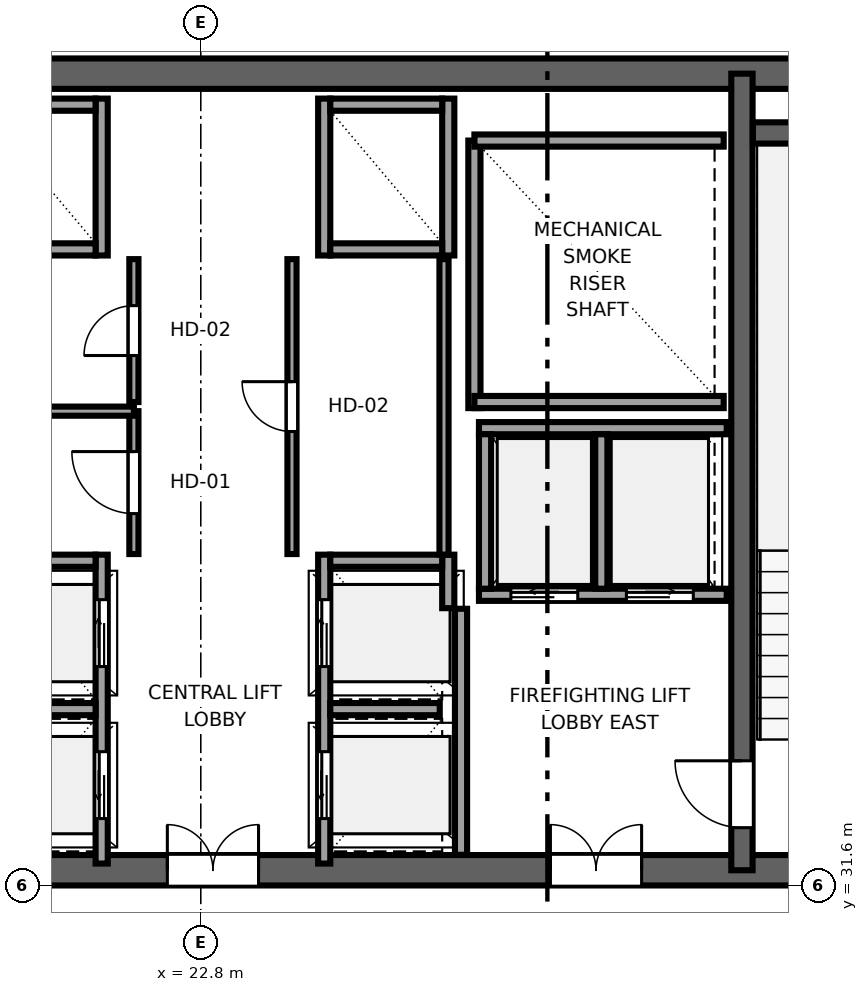
"""IFC4 building model, lengths in metres.
Left out: names, types, materials, properties, quantities, classifications, styles, units other than length and angle.
Written with IfcOpenShell. Run it as: python <this file> out.ifc"""

import sys

from ifc_helpers import new_model, si_unit, direction, frame, frame_2d, origin, place, context, subcontext, project, spatial, rectangle, extrude, source, transform, mapped, element, fill, save


model = new_model("IFC4")
c1 = context("Model", 3, precision=1e-05, world=origin(), true_north=direction((0.0, 1.0)))
c2 = subcontext(c1, "Body", "Model", "MODEL_VIEW")
j1 = project(units=[si_unit("LENGTHUNIT", "METRE"), si_unit("PLANEANGLEUNIT", "RADIAN")], contexts=[c1])
p1 = place(None, origin())
s1 = spatial("IfcSite", under=j1, at=p1, CompositionType="ELEMENT")
p2 = place(p1, origin())
s2 = spatial("IfcBuilding", under=s1, at=p2, CompositionType="ELEMENT")
p3 = place(p2, frame((0.0, 0.0, 255.85)))
s3 = spatial("IfcBuildingStorey", under=s2, at=p3, CompositionType="ELEMENT", Elevation=255.85)
p4 = place(p3, frame((10.0, 31.85, 0.0), z_axis=(0.0, 0.0, 1.0), x_axis=(1.0, 0.0, 0.0)))
e1 = element("IfcWall", 1, at=p4, inside=s3, PredefinedType="SHEAR", context=c2, shape_type="SweptSolid", body=[
    extrude(rectangle(XDim=26.0, YDim=0.5, at=frame_2d((13.0, 0.0))), origin(), (0.0, 0.0, 1.0), 3.55),
])
p5 = place(p4, frame((7.45, 0.0, 0.0), z_axis=(0.0, 0.0, 1.0), x_axis=(-1.0, 0.0, 0.0)))
e2 = element("IfcOpeningElement", 2, at=p5, cuts=e1, PredefinedType="OPENING", context=c2, shape_type="SweptSolid", body=[
    extrude(rectangle(XDim=1.5, YDim=2.04, at=frame_2d((0.75, 1.02))), frame((0.0, 0.26, 0.0), z_axis=(0.0, -1.0, 0.0), x_axis=(1.0, 0.0, 0.0)), (0.0, 0.0, 1.0), 0.52),
])
p6 = place(p4, frame((13.75, 0.0, 0.0), z_axis=(0.0, 0.0, 1.0), x_axis=(-1.0, 0.0, 0.0)))
e3 = element("IfcOpeningElement", 3, at=p6, cuts=e1, PredefinedType="OPENING", context=c2, shape_type="SweptSolid", body=[
    extrude(rectangle(XDim=1.5, YDim=2.04, at=frame_2d((0.75, 1.02))), frame((0.0, 0.26, 0.0), z_axis=(0.0, -1.0, 0.0), x_axis=(1.0, 0.0, 0.0)), (0.0, 0.0, 1.0), 0.52),
])
p7 = place(p4, frame((20.05, 0.0, 0.0), z_axis=(0.0, 0.0, 1.0), x_axis=(-1.0, 0.0, 0.0)))
e4 = element("IfcOpeningElement", 4, at=p7, cuts=e1, PredefinedType="OPENING", context=c2, shape_type="SweptSolid", body=[
    extrude(rectangle(XDim=1.5, YDim=2.04, at=frame_2d((0.75, 1.02))), frame((0.0, 0.26, 0.0), z_axis=(0.0, -1.0, 0.0), x_axis=(1.0, 0.0, 0.0)), (0.0, 0.0, 1.0), 0.52),
])
p8 = place(p3, frame((10.0, 44.95, 0.0), z_axis=(0.0, 0.0, 1.0), x_axis=(1.0, 0.0, 0.0)))
e5 = element("IfcWall", 5, at=p8, inside=s3, PredefinedType="SHEAR", context=c2, shape_type="SweptSolid", body=[
    extrude(rectangle(XDim=26.0, YDim=0.5, at=frame_2d((13.0, 0.0))), origin(), (0.0, 0.0, 1.0), 3.55),
])
p9 = place(p3, frame((31.7, 31.85, 0.0), z_axis=(0.0, 0.0, 1.0), x_axis=(0.0, 1.0, 0.0)))
e6 = element("IfcWall", 6, at=p9, inside=s3, PredefinedType="SHEAR", context=c2, shape_type="SweptSolid", body=[
    extrude(rectangle(XDim=13.1, YDim=0.35, at=frame_2d((6.55, 0.0))), origin(), (0.0, 0.0, 1.0), 3.55),
])
p10 = place(p9, frame((1.8, 0.0, 0.0), z_axis=(0.0, 0.0, 1.0), x_axis=(-1.0, 0.0, 0.0)))
e7 = element("IfcOpeningElement", 7, at=p10, cuts=e6, PredefinedType="OPENING", context=c2, shape_type="SweptSolid", body=[
    extrude(rectangle(XDim=1.1, YDim=2.12, at=frame_2d((0.55, 1.06))), frame((0.0, 0.185, 0.0), z_axis=(0.0, -1.0, 0.0), x_axis=(1.0, 0.0, 0.0)), (0.0, 0.0, 1.0), 0.37),
])
p11 = place(p3, frame((31.88, 43.975, 0.0), z_axis=(0.0, 0.0, 1.0), x_axis=(1.0, 0.0, 0.0)))
e8 = element("IfcWall", 8, at=p11, inside=s3, PredefinedType="SHEAR", context=c2, shape_type="SweptSolid", body=[
    extrude(rectangle(XDim=3.6, YDim=0.35, at=frame_2d((1.8, 0.0))), origin(), (0.0, 0.0, 1.0), 3.55),
])
p12 = place(p3, frame((27.3, 39.45, 0.0), z_axis=(0.0, 0.0, 1.0), x_axis=(0.0, 1.0, 0.0)))
e9 = element("IfcWall", 9, at=p12, inside=s3, PredefinedType="SOLIDWALL", context=c2, shape_type="SweptSolid", body=[
    extrude(rectangle(XDim=4.4, YDim=0.2, at=frame_2d((2.2, 0.0))), origin(), (0.0, 0.0, 1.0), 3.37),
])
for number, where, z_axis, x_axis in (
    (10, (27.3, 39.55, 0.0), (0.0, 0.0, 1.0), (1.0, 0.0, 0.0)),
    (11, (27.3, 43.85, 0.0), (0.0, 0.0, 1.0), (1.0, 0.0, 0.0)),
):
    element("IfcWall", number, at=place(p3, frame(where, z_axis=z_axis, x_axis=x_axis)), inside=s3, PredefinedType="SOLIDWALL", context=c2, shape_type="SweptSolid", body=[
        extrude(rectangle(XDim=4.1, YDim=0.2, at=frame_2d((2.05, 0.0))), origin(), (0.0, 0.0, 1.0), 3.37),
    ])
p13 = place(p3, frame((27.08, 32.104, 0.0), z_axis=(0.0, 0.0, 1.0), x_axis=(0.0, 1.0, 0.0)))
e12 = element("IfcWall", 12, at=p13, inside=s3, PredefinedType="SOLIDWALL", context=c2, shape_type="SweptSolid", body=[
    extrude(rectangle(XDim=4.046, YDim=0.2, at=frame_2d((2.023, 0.0))), origin(), (0.0, 0.0, 1.0), 3.37),
])
p14 = place(p3, frame((21.17, 31.96, 0.0), z_axis=(0.0, 0.0, 1.0), x_axis=(0.0, 1.0, 0.0)))
e13 = element("IfcWall", 13, at=p14, inside=s3, PredefinedType="SOLIDWALL", context=c2, shape_type="SweptSolid", body=[
    extrude(rectangle(XDim=5.08, YDim=0.2, at=frame_2d((2.54, 0.0))), origin(), (0.0, 0.0, 1.0), 3.37),
])
p15 = place(p14, frame((0.74, 0.0, 0.0)))
e14 = element("IfcOpeningElement", 14, at=p15, cuts=e13, PredefinedType="OPENING", context=c2, shape_type="SweptSolid", body=[
    extrude(rectangle(XDim=1.1, YDim=2.12, at=frame_2d((0.55, 1.06))), frame((0.0, 0.11, 0.0), z_axis=(0.0, -1.0, 0.0), x_axis=(1.0, 0.0, 0.0)), (0.0, 0.0, 1.0), 0.22),
])
p16 = place(p14, frame((3.24, 0.0, 0.0)))
e15 = element("IfcOpeningElement", 15, at=p16, cuts=e13, PredefinedType="OPENING", context=c2, shape_type="SweptSolid", body=[
    extrude(rectangle(XDim=1.1, YDim=2.12, at=frame_2d((0.55, 1.06))), frame((0.0, 0.11, 0.0), z_axis=(0.0, -1.0, 0.0), x_axis=(1.0, 0.0, 0.0)), (0.0, 0.0, 1.0), 0.22),
])
p17 = place(p3, frame((19.23, 36.94, 0.0), z_axis=(0.0, 0.0, 1.0), x_axis=(1.0, 0.0, 0.0)))
e16 = element("IfcWall", 16, at=p17, inside=s3, PredefinedType="SOLIDWALL", context=c2, shape_type="SweptSolid", body=[
    extrude(rectangle(XDim=1.84, YDim=0.2, at=frame_2d((0.92, 0.0))), origin(), (0.0, 0.0, 1.0), 3.37),
])
p18 = place(p3, frame((19.27, 34.5, 0.0), z_axis=(0.0, 0.0, 1.0), x_axis=(1.0, 0.0, 0.0)))
e17 = element("IfcWall", 17, at=p18, inside=s3, PredefinedType="SOLIDWALL", context=c2, shape_type="SweptSolid", body=[
    extrude(rectangle(XDim=1.8, YDim=0.2, at=frame_2d((0.9, 0.0))), origin(), (0.0, 0.0, 1.0), 3.37),
])
p19 = place(p3, frame((21.17, 41.96, 0.0), z_axis=(0.0, 0.0, 1.0), x_axis=(0.0, 1.0, 0.0)))
e18 = element("IfcWall", 18, at=p19, inside=s3, PredefinedType="SOLIDWALL", context=c2, shape_type="SweptSolid", body=[
    extrude(rectangle(XDim=2.58, YDim=0.2, at=frame_2d((1.29, 0.0))), origin(), (0.0, 0.0, 1.0), 3.37),
])
for number, where, z_axis, x_axis in (
    (19, (19.23, 42.06, 0.0), (0.0, 0.0, 1.0), (1.0, 0.0, 0.0)),
    (20, (19.23, 44.44, 0.0), (0.0, 0.0, 1.0), (1.0, 0.0, 0.0)),
):
    element("IfcWall", number, at=place(p3, frame(where, z_axis=z_axis, x_axis=x_axis)), inside=s3, PredefinedType="SOLIDWALL", context=c2, shape_type="SweptSolid", body=[
        extrude(rectangle(XDim=1.84, YDim=0.2, at=frame_2d((0.92, 0.0))), origin(), (0.0, 0.0, 1.0), 3.37),
    ])
p20 = place(p3, frame((27.375, 36.38, 0.0), z_axis=(0.0, 0.0, 1.0), x_axis=(1.0, 0.0, 0.0)))
e21 = element("IfcWall", 21, at=p20, inside=s3, PredefinedType="SOLIDWALL", context=c2, shape_type="SweptSolid", body=[
    extrude(rectangle(XDim=4.075, YDim=0.2, at=frame_2d((2.038, 0.0))), origin(), (0.0, 0.0, 1.0), 3.37),
])
p21 = place(p20, frame((0.525, 0.0, 0.0)))
e22 = element("IfcOpeningElement", 22, at=p21, cuts=e21, PredefinedType="OPENING", context=c2, shape_type="SweptSolid", body=[
    extrude(rectangle(XDim=1.1, YDim=2.12, at=frame_2d((0.55, 1.06))), frame((0.0, 0.11, 0.0), z_axis=(0.0, -1.0, 0.0), x_axis=(1.0, 0.0, 0.0)), (0.0, 0.0, 1.0), 0.22),
])
p22 = place(p20, frame((2.425, 0.0, 0.0)))
e23 = element("IfcOpeningElement", 23, at=p22, cuts=e21, PredefinedType="OPENING", context=c2, shape_type="SweptSolid", body=[
    extrude(rectangle(XDim=1.1, YDim=2.12, at=frame_2d((0.55, 1.06))), frame((0.0, 0.11, 0.0), z_axis=(0.0, -1.0, 0.0), x_axis=(1.0, 0.0, 0.0)), (0.0, 0.0, 1.0), 0.22),
])
p23 = place(p3, frame((27.375, 39.12, 0.0), z_axis=(0.0, 0.0, 1.0), x_axis=(1.0, 0.0, 0.0)))
e24 = element("IfcWall", 24, at=p23, inside=s3, PredefinedType="SOLIDWALL", context=c2, shape_type="SweptSolid", body=[
    extrude(rectangle(XDim=4.075, YDim=0.2, at=frame_2d((2.038, 0.0))), origin(), (0.0, 0.0, 1.0), 3.37),
])
for number, where, z_axis, x_axis in (
    (25, (27.475, 36.48, 0.0), (0.0, 0.0, 1.0), (0.0, 1.0, 0.0)),
    (26, (29.387, 36.48, 0.0), (0.0, 0.0, 1.0), (0.0, 1.0, 0.0)),
):
    element("IfcWall", number, at=place(p3, frame(where, z_axis=z_axis, x_axis=x_axis)), inside=s3, PredefinedType="SOLIDWALL", context=c2, shape_type="SweptSolid", body=[
        extrude(rectangle(XDim=2.54, YDim=0.2, at=frame_2d((1.27, 0.0))), origin(), (0.0, 0.0, 1.0), 3.37),
    ])
p24 = place(p3, frame((24.83, 31.96, 0.0), z_axis=(0.0, 0.0, 1.0), x_axis=(0.0, 1.0, 0.0)))
e27 = element("IfcWall", 27, at=p24, inside=s3, PredefinedType="SOLIDWALL", context=c2, shape_type="SweptSolid", body=[
    extrude(rectangle(XDim=5.08, YDim=0.2, at=frame_2d((2.54, 0.0))), origin(), (0.0, 0.0, 1.0), 3.37),
])
p25 = place(p24, frame((0.74, 0.0, 0.0)))
e28 = element("IfcOpeningElement", 28, at=p25, cuts=e27, PredefinedType="OPENING", context=c2, shape_type="SweptSolid", body=[
    extrude(rectangle(XDim=1.1, YDim=2.12, at=frame_2d((0.55, 1.06))), frame((0.0, 0.11, 0.0), z_axis=(0.0, -1.0, 0.0), x_axis=(1.0, 0.0, 0.0)), (0.0, 0.0, 1.0), 0.22),
])
p26 = place(p24, frame((3.24, 0.0, 0.0)))
e29 = element("IfcOpeningElement", 29, at=p26, cuts=e27, PredefinedType="OPENING", context=c2, shape_type="SweptSolid", body=[
    extrude(rectangle(XDim=1.1, YDim=2.12, at=frame_2d((0.55, 1.06))), frame((0.0, 0.11, 0.0), z_axis=(0.0, -1.0, 0.0), x_axis=(1.0, 0.0, 0.0)), (0.0, 0.0, 1.0), 0.22),
])
p27 = place(p3, frame((26.87, 36.16, 0.0), z_axis=(0.0, 0.0, 1.0), x_axis=(0.0, 1.0, 0.0)))
e30 = element("IfcWall", 30, at=p27, inside=s3, PredefinedType="SOLIDWALL", context=c2, shape_type="SweptSolid", body=[
    extrude(rectangle(XDim=0.88, YDim=0.2, at=frame_2d((0.44, 0.0))), origin(), (0.0, 0.0, 1.0), 3.37),
])
p28 = place(p3, frame((24.93, 36.94, 0.0), z_axis=(0.0, 0.0, 1.0), x_axis=(1.0, 0.0, 0.0)))
e31 = element("IfcWall", 31, at=p28, inside=s3, PredefinedType="SOLIDWALL", context=c2, shape_type="SweptSolid", body=[
    extrude(rectangle(XDim=1.84, YDim=0.2, at=frame_2d((0.92, 0.0))), origin(), (0.0, 0.0, 1.0), 3.37),
])
p29 = place(p3, frame((24.93, 34.5, 0.0), z_axis=(0.0, 0.0, 1.0), x_axis=(1.0, 0.0, 0.0)))
e32 = element("IfcWall", 32, at=p29, inside=s3, PredefinedType="SOLIDWALL", context=c2, shape_type="SweptSolid", body=[
    extrude(rectangle(XDim=1.8, YDim=0.2, at=frame_2d((0.9, 0.0))), origin(), (0.0, 0.0, 1.0), 3.37),
])
for number, where, z_axis, x_axis in (
    (33, (24.83, 41.96, 0.0), (0.0, 0.0, 1.0), (0.0, 1.0, 0.0)),
    (34, (26.87, 41.96, 0.0), (0.0, 0.0, 1.0), (0.0, 1.0, 0.0)),
):
    element("IfcWall", number, at=place(p3, frame(where, z_axis=z_axis, x_axis=x_axis)), inside=s3, PredefinedType="SOLIDWALL", context=c2, shape_type="SweptSolid", body=[
        extrude(rectangle(XDim=2.58, YDim=0.2, at=frame_2d((1.29, 0.0))), origin(), (0.0, 0.0, 1.0), 3.37),
    ])
for number, where, z_axis, x_axis in (
    (35, (24.93, 42.06, 0.0), (0.0, 0.0, 1.0), (1.0, 0.0, 0.0)),
    (36, (24.93, 44.44, 0.0), (0.0, 0.0, 1.0), (1.0, 0.0, 0.0)),
):
    element("IfcWall", number, at=place(p3, frame(where, z_axis=z_axis, x_axis=x_axis)), inside=s3, PredefinedType="SOLIDWALL", context=c2, shape_type="SweptSolid", body=[
        extrude(rectangle(XDim=1.84, YDim=0.2, at=frame_2d((0.92, 0.0))), origin(), (0.0, 0.0, 1.0), 3.37),
    ])
p30 = place(p3, frame((21.7, 37.05, 0.0), z_axis=(0.0, 0.0, 1.0), x_axis=(0.0, 1.0, 0.0)))
e37 = element("IfcWall", 37, at=p30, inside=s3, PredefinedType="PARTITIONING", context=c2, shape_type="SweptSolid", body=[
    extrude(rectangle(XDim=2.35, YDim=0.15, at=frame_2d((1.175, 0.0))), origin(), (0.0, 0.0, 1.0), 3.37),
])
p31 = place(p30, frame((0.665, 0.0, 0.0)))
e38 = element("IfcOpeningElement", 38, at=p31, cuts=e37, PredefinedType="OPENING", context=c2, shape_type="SweptSolid", body=[
    extrude(rectangle(XDim=1.02, YDim=2.03, at=frame_2d((0.51, 1.015))), frame((0.0, 0.085, 0.0), z_axis=(0.0, -1.0, 0.0), x_axis=(1.0, 0.0, 0.0)), (0.0, 0.0, 1.0), 0.17),
])
p32 = place(p3, frame((19.2, 39.4, 0.0), z_axis=(0.0, 0.0, 1.0), x_axis=(1.0, 0.0, 0.0)))
e39 = element("IfcWall", 39, at=p32, inside=s3, PredefinedType="PARTITIONING", context=c2, shape_type="SweptSolid", body=[
    extrude(rectangle(XDim=2.5, YDim=0.15, at=frame_2d((1.25, 0.0))), origin(), (0.0, 0.0, 1.0), 3.37),
])
p33 = place(p3, frame((21.7, 39.55, 0.0), z_axis=(0.0, 0.0, 1.0), x_axis=(0.0, 1.0, 0.0)))
e40 = element("IfcWall", 40, at=p33, inside=s3, PredefinedType="PARTITIONING", context=c2, shape_type="SweptSolid", body=[
    extrude(rectangle(XDim=2.35, YDim=0.15, at=frame_2d((1.175, 0.0))), origin(), (0.0, 0.0, 1.0), 3.37),
])
p34 = place(p33, frame((0.765, 0.0, 0.0)))
e41 = element("IfcOpeningElement", 41, at=p34, cuts=e40, PredefinedType="OPENING", context=c2, shape_type="SweptSolid", body=[
    extrude(rectangle(XDim=0.82, YDim=2.01, at=frame_2d((0.41, 1.005))), frame((0.0, 0.085, 0.0), z_axis=(0.0, -1.0, 0.0), x_axis=(1.0, 0.0, 0.0)), (0.0, 0.0, 1.0), 0.17),
])
p35 = place(p3, frame((24.3, 37.05, 0.0), z_axis=(0.0, 0.0, 1.0), x_axis=(0.0, 1.0, 0.0)))
e42 = element("IfcWall", 42, at=p35, inside=s3, PredefinedType="PARTITIONING", context=c2, shape_type="SweptSolid", body=[
    extrude(rectangle(XDim=4.85, YDim=0.15, at=frame_2d((2.425, 0.0))), origin(), (0.0, 0.0, 1.0), 3.37),
])
p36 = place(p35, frame((2.015, 0.0, 0.0)))
e43 = element("IfcOpeningElement", 43, at=p36, cuts=e42, PredefinedType="OPENING", context=c2, shape_type="SweptSolid", body=[
    extrude(rectangle(XDim=0.82, YDim=2.01, at=frame_2d((0.41, 1.005))), frame((0.0, 0.085, 0.0), z_axis=(0.0, -1.0, 0.0), x_axis=(1.0, 0.0, 0.0)), (0.0, 0.0, 1.0), 0.17),
])
p37 = place(p3, frame((26.8, 37.04, 0.0), z_axis=(0.0, 0.0, 1.0), x_axis=(0.0, 1.0, 0.0)))
e44 = element("IfcWall", 44, at=p37, inside=s3, PredefinedType="PARTITIONING", context=c2, shape_type="SweptSolid", body=[
    extrude(rectangle(XDim=4.86, YDim=0.15, at=frame_2d((2.43, 0.0))), origin(), (0.0, 0.0, 1.0), 3.37),
])
m1 = source(origin(), c2, "Body", "SweptSolid", [
    extrude(rectangle(XDim=1.1, YDim=2.12, at=frame_2d((0.55, 1.06))), frame((0.0, 0.025, 0.0), z_axis=(0.0, -1.0, 0.0), x_axis=(1.0, 0.0, 0.0)), (0.0, 0.0, 1.0), 0.05),
])
p38 = place(p10, origin())
e45 = element("IfcDoor", 45, at=p38, inside=s3, OperationType="SINGLE_SWING_RIGHT", PredefinedType="DOOR", context=c2, shape_type="MappedRepresentation", body=[
    mapped(m1, transform((0.0, 0.0, 0.0), x_axis=(1.0, 0.0, 0.0), y_axis=(0.0, 1.0, 0.0), z_axis=(0.0, 0.0, 1.0), scale=1.0)),
])
fill(e7, e45)
m2 = source(origin(), c2, "Body", "SweptSolid", [
    extrude(rectangle(XDim=1.5, YDim=2.04, at=frame_2d((0.75, 1.02))), frame((0.0, 0.025, 0.0), z_axis=(0.0, -1.0, 0.0), x_axis=(1.0, 0.0, 0.0)), (0.0, 0.0, 1.0), 0.05),
])
p39 = place(p6, origin())
e46 = element("IfcDoor", 46, at=p39, inside=s3, OperationType="DOUBLE_DOOR_SINGLE_SWING", PredefinedType="DOOR", context=c2, shape_type="MappedRepresentation", body=[
    mapped(m2, transform((0.0, 0.0, 0.0), x_axis=(1.0, 0.0, 0.0), y_axis=(0.0, 1.0, 0.0), z_axis=(0.0, 0.0, 1.0), scale=1.0)),
])
fill(e3, e46)
p40 = place(p7, origin())
e47 = element("IfcDoor", 47, at=p40, inside=s3, OperationType="DOUBLE_DOOR_SINGLE_SWING", PredefinedType="DOOR", context=c2, shape_type="MappedRepresentation", body=[
    mapped(m2, transform((0.0, 0.0, 0.0), x_axis=(1.0, 0.0, 0.0), y_axis=(0.0, 1.0, 0.0), z_axis=(0.0, 0.0, 1.0), scale=1.0)),
])
fill(e4, e47)
m3 = source(origin(), c2, "Body", "SweptSolid", [
    extrude(rectangle(XDim=1.1, YDim=2.12, at=frame_2d((0.55, 1.06))), frame((0.0, 0.025, 0.0), z_axis=(0.0, -1.0, 0.0), x_axis=(1.0, 0.0, 0.0)), (0.0, 0.0, 1.0), 0.05),
])
p41 = place(p15, origin())
e48 = element("IfcDoor", 48, at=p41, inside=s3, OperationType="SLIDING_TO_LEFT", PredefinedType="DOOR", context=c2, shape_type="MappedRepresentation", body=[
    mapped(m3, transform((0.0, 0.0, 0.0), x_axis=(1.0, 0.0, 0.0), y_axis=(0.0, 1.0, 0.0), z_axis=(0.0, 0.0, 1.0), scale=1.0)),
])
fill(e14, e48)
p42 = place(p16, origin())
e49 = element("IfcDoor", 49, at=p42, inside=s3, OperationType="SLIDING_TO_RIGHT", PredefinedType="DOOR", context=c2, shape_type="MappedRepresentation", body=[
    mapped(m3, transform((0.0, 0.0, 0.0), x_axis=(1.0, 0.0, 0.0), y_axis=(0.0, 1.0, 0.0), z_axis=(0.0, 0.0, 1.0), scale=1.0)),
])
fill(e15, e49)
p43 = place(p21, origin())
e50 = element("IfcDoor", 50, at=p43, inside=s3, OperationType="SLIDING_TO_LEFT", PredefinedType="DOOR", context=c2, shape_type="MappedRepresentation", body=[
    mapped(m3, transform((0.0, 0.0, 0.0), x_axis=(1.0, 0.0, 0.0), y_axis=(0.0, 1.0, 0.0), z_axis=(0.0, 0.0, 1.0), scale=1.0)),
])
fill(e22, e50)
p44 = place(p22, origin())
e51 = element("IfcDoor", 51, at=p44, inside=s3, OperationType="SLIDING_TO_RIGHT", PredefinedType="DOOR", context=c2, shape_type="MappedRepresentation", body=[
    mapped(m3, transform((0.0, 0.0, 0.0), x_axis=(1.0, 0.0, 0.0), y_axis=(0.0, 1.0, 0.0), z_axis=(0.0, 0.0, 1.0), scale=1.0)),
])
fill(e23, e51)
p45 = place(p25, origin())
e52 = element("IfcDoor", 52, at=p45, inside=s3, OperationType="SLIDING_TO_LEFT", PredefinedType="DOOR", context=c2, shape_type="MappedRepresentation", body=[
    mapped(m3, transform((0.0, 0.0, 0.0), x_axis=(1.0, 0.0, 0.0), y_axis=(0.0, 1.0, 0.0), z_axis=(0.0, 0.0, 1.0), scale=1.0)),
])
fill(e28, e52)
p46 = place(p26, origin())
e53 = element("IfcDoor", 53, at=p46, inside=s3, OperationType="SLIDING_TO_RIGHT", PredefinedType="DOOR", context=c2, shape_type="MappedRepresentation", body=[
    mapped(m3, transform((0.0, 0.0, 0.0), x_axis=(1.0, 0.0, 0.0), y_axis=(0.0, 1.0, 0.0), z_axis=(0.0, 0.0, 1.0), scale=1.0)),
])
fill(e29, e53)
m4 = source(origin(), c2, "Body", "SweptSolid", [
    extrude(rectangle(XDim=1.02, YDim=2.03, at=frame_2d((0.51, 1.015))), frame((0.0, 0.025, 0.0), z_axis=(0.0, -1.0, 0.0), x_axis=(1.0, 0.0, 0.0)), (0.0, 0.0, 1.0), 0.05),
])
p47 = place(p31, origin())
e54 = element("IfcDoor", 54, at=p47, inside=s3, OperationType="SINGLE_SWING_RIGHT", PredefinedType="DOOR", context=c2, shape_type="MappedRepresentation", body=[
    mapped(m4, transform((0.0, 0.0, 0.0), x_axis=(1.0, 0.0, 0.0), y_axis=(0.0, 1.0, 0.0), z_axis=(0.0, 0.0, 1.0), scale=1.0)),
])
fill(e38, e54)
m5 = source(origin(), c2, "Body", "SweptSolid", [
    extrude(rectangle(XDim=0.82, YDim=2.01, at=frame_2d((0.41, 1.005))), frame((0.0, 0.025, 0.0), z_axis=(0.0, -1.0, 0.0), x_axis=(1.0, 0.0, 0.0)), (0.0, 0.0, 1.0), 0.05),
])
p48 = place(p34, origin())
e55 = element("IfcDoor", 55, at=p48, inside=s3, OperationType="SINGLE_SWING_LEFT", PredefinedType="DOOR", context=c2, shape_type="MappedRepresentation", body=[
    mapped(m5, transform((0.0, 0.0, 0.0), x_axis=(1.0, 0.0, 0.0), y_axis=(0.0, 1.0, 0.0), z_axis=(0.0, 0.0, 1.0), scale=1.0)),
])
fill(e41, e55)
p49 = place(p36, origin())
e56 = element("IfcDoor", 56, at=p49, inside=s3, OperationType="SINGLE_SWING_RIGHT", PredefinedType="DOOR", context=c2, shape_type="MappedRepresentation", body=[
    mapped(m5, transform((0.0, 0.0, 0.0), x_axis=(1.0, 0.0, 0.0), y_axis=(0.0, 1.0, 0.0), z_axis=(0.0, 0.0, 1.0), scale=1.0)),
])
fill(e43, e56)
save(model, sys.argv[1])
